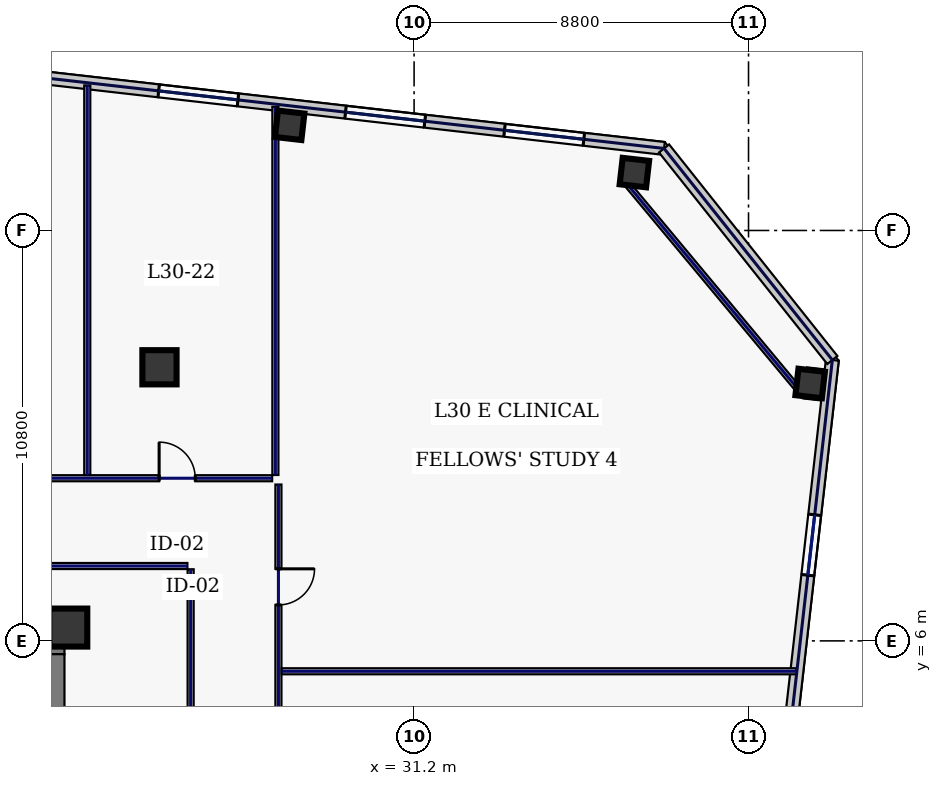
"""IFC4 building model, lengths in metres.
Left out: names, types, materials, properties, quantities, classifications, styles, units other than length and angle.
Written with IfcOpenShell. Run it as: python <this file> out.ifc"""

import sys

from ifc_helpers import new_model, si_unit, direction, frame, frame_2d, origin, origin_2d, place, context, subcontext, project, spatial, rectangle, hollow_rectangle, extrude, element, fill, save


model = new_model("IFC4")
c1 = context("Model", 3, precision=1e-05, world=origin(), true_north=direction((0.0, 1.0)))
c2 = subcontext(c1, "Body", "Model", "MODEL_VIEW")
j1 = project(units=[si_unit("LENGTHUNIT", "METRE"), si_unit("PLANEANGLEUNIT", "RADIAN")], contexts=[c1])
p1 = place(None, origin())
s1 = spatial("IfcSite", under=j1, at=p1, CompositionType="ELEMENT")
p2 = place(p1, origin())
s2 = spatial("IfcBuilding", under=s1, at=p2, CompositionType="ELEMENT")
p3 = place(p2, frame((0.0, 0.0, 133.4)))
s3 = spatial("IfcBuildingStorey", under=s2, at=p3, CompositionType="ELEMENT", Elevation=133.4)
p4 = place(p3, frame((10.45, 6.0, 0.0), z_axis=(0.0, 0.0, 1.0), x_axis=(1.0, 0.0, 0.0)))
e1 = element("IfcWall", 1, at=p4, inside=s3, PredefinedType="SHEAR", context=c2, shape_type="SweptSolid", body=[
    extrude(rectangle(XDim=11.55, YDim=0.7, at=frame_2d((5.775, 0.0))), origin(), (0.0, 0.0, 1.0), 3.74),
])
p5 = place(p3, frame((21.6, -5.65, 0.0), z_axis=(0.0, 0.0, 1.0), x_axis=(0.0, 1.0, 0.0)))
e2 = element("IfcWall", 2, at=p5, inside=s3, PredefinedType="SHEAR", context=c2, shape_type="SweptSolid", body=[
    extrude(rectangle(XDim=11.3, YDim=0.8, at=frame_2d((5.65, 0.0))), origin(), (0.0, 0.0, 1.0), 3.74),
])
p6 = place(p3, frame((22.1, 6.35, 0.0), z_axis=(0.0, 0.0, 1.0), x_axis=(1.0, 0.0, 0.0)))
e3 = element("IfcColumn", 3, at=p6, inside=s3, PredefinedType="COLUMN", context=c2, shape_type="SweptSolid", body=[
    extrude(hollow_rectangle(XDim=1.0, YDim=1.0, WallThickness=0.045, at=origin_2d()), origin(), (0.0, 0.0, 1.0), 3.74),
])
p7 = place(p3, frame((24.5, 13.2, 0.0), z_axis=(0.0, 0.0, 1.0), x_axis=(1.0, 0.0, 0.0)))
e4 = element("IfcColumn", 4, at=p7, inside=s3, PredefinedType="COLUMN", context=c2, shape_type="SweptSolid", body=[
    extrude(hollow_rectangle(XDim=0.9, YDim=0.9, WallThickness=0.04, at=origin_2d()), origin(), (0.0, 0.0, 1.0), 3.74),
])
for number, where, z_axis, x_axis in (
    (5, (36.997, 18.323, 0.0), (0.0, 0.0, 1.0), (0.994, -0.113, 0.0)),
    (6, (27.926, 19.568, 0.0), (0.0, 0.0, 1.0), (0.994, -0.113, 0.0)),
    (7, (41.622, 12.774, 0.0), (0.0, 0.0, 1.0), (0.994, -0.113, 0.0)),
):
    element("IfcColumn", number, at=place(p3, frame(where, z_axis=z_axis, x_axis=x_axis)), inside=s3, PredefinedType="COLUMN", context=c2, shape_type="SweptSolid", body=[
        extrude(hollow_rectangle(XDim=0.7, YDim=0.7, WallThickness=0.032, at=origin_2d()), origin(), (0.0, 0.0, 1.0), 3.74),
    ])
p8 = place(p3, frame((37.777, 18.958, 0.0), z_axis=(0.0, 0.0, 1.0), x_axis=(-0.993571362037, 0.113207546299, 0.0)))
e8 = element("IfcWall", 8, at=p8, inside=s3, PredefinedType="STANDARD", context=c2, shape_type="SweptSolid", body=[
    extrude(rectangle(XDim=21.223, YDim=0.34, at=frame_2d((10.611, 0.0))), origin(), (0.0, 0.0, 1.0), 3.74),
])
p9 = place(p8, frame((16.756, 0.0, 0.67)))
e9 = element("IfcOpeningElement", 9, at=p9, cuts=e8, PredefinedType="OPENING", context=c2, shape_type="SweptSolid", body=[
    extrude(rectangle(XDim=0.85, YDim=1.85, at=frame_2d((0.425, 0.925))), frame((0.0, 0.18, 0.0), z_axis=(0.0, -1.0, 0.0), x_axis=(1.0, 0.0, 0.0)), (0.0, 0.0, 1.0), 0.36),
])
p10 = place(p8, frame((11.285, 0.0, 0.67)))
e10 = element("IfcOpeningElement", 10, at=p10, cuts=e8, PredefinedType="OPENING", context=c2, shape_type="SweptSolid", body=[
    extrude(rectangle(XDim=2.1, YDim=2.2, at=frame_2d((1.05, 1.1))), frame((0.0, 0.18, 0.0), z_axis=(0.0, -1.0, 0.0), x_axis=(1.0, 0.0, 0.0)), (0.0, 0.0, 1.0), 0.36),
])
p11 = place(p8, frame((6.336, 0.0, 0.67)))
e11 = element("IfcOpeningElement", 11, at=p11, cuts=e8, PredefinedType="OPENING", context=c2, shape_type="SweptSolid", body=[
    extrude(rectangle(XDim=2.1, YDim=2.2, at=frame_2d((1.05, 1.1))), frame((0.0, 0.18, 0.0), z_axis=(0.0, -1.0, 0.0), x_axis=(1.0, 0.0, 0.0)), (0.0, 0.0, 1.0), 0.36),
])
p12 = place(p8, frame((2.125, 0.0, 0.67)))
e12 = element("IfcOpeningElement", 12, at=p12, cuts=e8, PredefinedType="OPENING", context=c2, shape_type="SweptSolid", body=[
    extrude(rectangle(XDim=2.1, YDim=2.2, at=frame_2d((1.05, 1.1))), frame((0.0, 0.18, 0.0), z_axis=(0.0, -1.0, 0.0), x_axis=(1.0, 0.0, 0.0)), (0.0, 0.0, 1.0), 0.36),
])
p13 = place(p3, frame((37.768, -25.556, 0.0), z_axis=(0.0, 0.0, 1.0), x_axis=(0.113201605824, 0.993572038877, 0.0)))
e13 = element("IfcWall", 13, at=p13, inside=s3, PredefinedType="STANDARD", context=c2, shape_type="SweptSolid", body=[
    extrude(rectangle(XDim=39.2, YDim=0.34, at=frame_2d((19.6, 0.0))), origin(), (0.0, 0.0, 1.0), 3.74),
])
p14 = place(p13, frame((4.1, 0.0, 0.58)))
e14 = element("IfcOpeningElement", 14, at=p14, cuts=e13, PredefinedType="OPENING", context=c2, shape_type="SweptSolid", body=[
    extrude(rectangle(XDim=1.6, YDim=2.3, at=frame_2d((0.8, 1.15))), frame((0.0, 0.18, 0.0), z_axis=(0.0, -1.0, 0.0), x_axis=(1.0, 0.0, 0.0)), (0.0, 0.0, 1.0), 0.36),
])
p15 = place(p13, frame((13.9, 0.0, 0.58)))
e15 = element("IfcOpeningElement", 15, at=p15, cuts=e13, PredefinedType="OPENING", context=c2, shape_type="SweptSolid", body=[
    extrude(rectangle(XDim=1.6, YDim=2.3, at=frame_2d((0.8, 1.15))), frame((0.0, 0.18, 0.0), z_axis=(0.0, -1.0, 0.0), x_axis=(1.0, 0.0, 0.0)), (0.0, 0.0, 1.0), 0.36),
])
p16 = place(p13, frame((23.35, 0.0, 0.75)))
e16 = element("IfcOpeningElement", 16, at=p16, cuts=e13, PredefinedType="OPENING", context=c2, shape_type="SweptSolid", body=[
    extrude(rectangle(XDim=0.85, YDim=1.85, at=frame_2d((0.425, 0.925))), frame((0.0, 0.18, 0.0), z_axis=(0.0, -1.0, 0.0), x_axis=(1.0, 0.0, 0.0)), (0.0, 0.0, 1.0), 0.36),
])
p17 = place(p13, frame((33.5, 0.0, 0.58)))
e17 = element("IfcOpeningElement", 17, at=p17, cuts=e13, PredefinedType="OPENING", context=c2, shape_type="SweptSolid", body=[
    extrude(rectangle(XDim=1.6, YDim=2.3, at=frame_2d((0.8, 1.15))), frame((0.0, 0.18, 0.0), z_axis=(0.0, -1.0, 0.0), x_axis=(1.0, 0.0, 0.0)), (0.0, 0.0, 1.0), 0.36),
])
p18 = place(p3, frame((42.206, 13.392, 0.0), z_axis=(0.0, 0.0, 1.0), x_axis=(-0.622524521309, 0.782600294128, 0.0)))
e18 = element("IfcWall", 18, at=p18, inside=s3, PredefinedType="STANDARD", context=c2, shape_type="SweptSolid", body=[
    extrude(rectangle(XDim=7.113, YDim=0.34, at=frame_2d((3.557, 0.0))), origin(), (0.0, 0.0, 1.0), 3.74),
])
p19 = place(p3, frame((41.361, 12.556, 0.0), z_axis=(0.0, 0.0, 1.0), x_axis=(-0.640217638562, 0.768193579298, 0.0)))
e19 = element("IfcWall", 19, at=p19, inside=s3, PredefinedType="PARTITIONING", context=c2, shape_type="SweptSolid", body=[
    extrude(rectangle(XDim=7.224, YDim=0.16, at=frame_2d((3.612, 0.0))), origin(), (0.0, 0.0, 1.0), 3.74),
])
p20 = place(p3, frame((-27.465, 10.28, 0.0), z_axis=(0.0, 0.0, 1.0), x_axis=(1.0, 0.0, 0.0)))
e20 = element("IfcWall", 20, at=p20, inside=s3, PredefinedType="PARTITIONING", context=c2, shape_type="SweptSolid", body=[
    extrude(rectangle(XDim=54.93, YDim=0.16, at=frame_2d((27.465, 0.0))), origin(), (0.0, 0.0, 1.0), 3.74),
])
p21 = place(p20, frame((1.869, 0.0, 0.0)))
e21 = element("IfcOpeningElement", 21, at=p21, cuts=e20, PredefinedType="OPENING", context=c2, shape_type="SweptSolid", body=[
    extrude(rectangle(XDim=1.3, YDim=2.2, at=frame_2d((0.65, 1.1))), frame((0.0, 0.09, 0.0), z_axis=(0.0, -1.0, 0.0), x_axis=(1.0, 0.0, 0.0)), (0.0, 0.0, 1.0), 0.18),
])
p22 = place(p20, frame((7.1, 0.0, 0.0)))
e22 = element("IfcOpeningElement", 22, at=p22, cuts=e20, PredefinedType="OPENING", context=c2, shape_type="SweptSolid", body=[
    extrude(rectangle(XDim=0.95, YDim=2.2, at=frame_2d((0.475, 1.1))), frame((0.0, 0.09, 0.0), z_axis=(0.0, -1.0, 0.0), x_axis=(1.0, 0.0, 0.0)), (0.0, 0.0, 1.0), 0.18),
])
p23 = place(p20, frame((12.5, 0.0, 0.0)))
e23 = element("IfcOpeningElement", 23, at=p23, cuts=e20, PredefinedType="OPENING", context=c2, shape_type="SweptSolid", body=[
    extrude(rectangle(XDim=0.95, YDim=2.2, at=frame_2d((0.475, 1.1))), frame((0.0, 0.09, 0.0), z_axis=(0.0, -1.0, 0.0), x_axis=(1.0, 0.0, 0.0)), (0.0, 0.0, 1.0), 0.18),
])
p24 = place(p20, frame((18.325, 0.0, 0.0)))
e24 = element("IfcOpeningElement", 24, at=p24, cuts=e20, PredefinedType="OPENING", context=c2, shape_type="SweptSolid", body=[
    extrude(rectangle(XDim=0.95, YDim=2.2, at=frame_2d((0.475, 1.1))), frame((0.0, 0.09, 0.0), z_axis=(0.0, -1.0, 0.0), x_axis=(1.0, 0.0, 0.0)), (0.0, 0.0, 1.0), 0.18),
])
p25 = place(p20, frame((24.575, 0.0, 0.0)))
e25 = element("IfcOpeningElement", 25, at=p25, cuts=e20, PredefinedType="OPENING", context=c2, shape_type="SweptSolid", body=[
    extrude(rectangle(XDim=0.95, YDim=2.2, at=frame_2d((0.475, 1.1))), frame((0.0, 0.09, 0.0), z_axis=(0.0, -1.0, 0.0), x_axis=(1.0, 0.0, 0.0)), (0.0, 0.0, 1.0), 0.18),
])
p26 = place(p20, frame((30.69, 0.0, 0.0)))
e26 = element("IfcOpeningElement", 26, at=p26, cuts=e20, PredefinedType="OPENING", context=c2, shape_type="SweptSolid", body=[
    extrude(rectangle(XDim=1.3, YDim=2.2, at=frame_2d((0.65, 1.1))), frame((0.0, 0.09, 0.0), z_axis=(0.0, -1.0, 0.0), x_axis=(1.0, 0.0, 0.0)), (0.0, 0.0, 1.0), 0.18),
])
p27 = place(p20, frame((37.02, 0.0, 0.0)))
e27 = element("IfcOpeningElement", 27, at=p27, cuts=e20, PredefinedType="OPENING", context=c2, shape_type="SweptSolid", body=[
    extrude(rectangle(XDim=1.3, YDim=2.2, at=frame_2d((0.65, 1.1))), frame((0.0, 0.09, 0.0), z_axis=(0.0, -1.0, 0.0), x_axis=(1.0, 0.0, 0.0)), (0.0, 0.0, 1.0), 0.18),
])
p28 = place(p20, frame((44.73, 0.0, 0.0)))
e28 = element("IfcOpeningElement", 28, at=p28, cuts=e20, PredefinedType="OPENING", context=c2, shape_type="SweptSolid", body=[
    extrude(rectangle(XDim=1.3, YDim=2.2, at=frame_2d((0.65, 1.1))), frame((0.0, 0.09, 0.0), z_axis=(0.0, -1.0, 0.0), x_axis=(1.0, 0.0, 0.0)), (0.0, 0.0, 1.0), 0.18),
])
p29 = place(p20, frame((51.956, 0.0, 0.0)))
e29 = element("IfcOpeningElement", 29, at=p29, cuts=e20, PredefinedType="OPENING", context=c2, shape_type="SweptSolid", body=[
    extrude(rectangle(XDim=0.95, YDim=2.2, at=frame_2d((0.475, 1.1))), frame((0.0, 0.09, 0.0), z_axis=(0.0, -1.0, 0.0), x_axis=(1.0, 0.0, 0.0)), (0.0, 0.0, 1.0), 0.18),
])
p30 = place(p3, frame((27.63, 10.115, 0.0), z_axis=(0.0, 0.0, 1.0), x_axis=(0.0, -1.0, 0.0)))
e30 = element("IfcWall", 30, at=p30, inside=s3, PredefinedType="PARTITIONING", context=c2, shape_type="SweptSolid", body=[
    extrude(rectangle(XDim=20.13, YDim=0.16, at=frame_2d((10.065, 0.0))), origin(), (0.0, 0.0, 1.0), 3.74),
])
p31 = place(p30, frame((17.181, 0.0, 0.0)))
e31 = element("IfcOpeningElement", 31, at=p31, cuts=e30, PredefinedType="OPENING", context=c2, shape_type="SweptSolid", body=[
    extrude(rectangle(XDim=0.95, YDim=2.2, at=frame_2d((0.475, 1.1))), frame((0.0, 0.09, 0.0), z_axis=(0.0, -1.0, 0.0), x_axis=(1.0, 0.0, 0.0)), (0.0, 0.0, 1.0), 0.18),
])
p32 = place(p30, frame((12.325, 0.0, 0.0)))
e32 = element("IfcOpeningElement", 32, at=p32, cuts=e30, PredefinedType="OPENING", context=c2, shape_type="SweptSolid", body=[
    extrude(rectangle(XDim=0.95, YDim=2.2, at=frame_2d((0.475, 1.1))), frame((0.0, 0.09, 0.0), z_axis=(0.0, -1.0, 0.0), x_axis=(1.0, 0.0, 0.0)), (0.0, 0.0, 1.0), 0.18),
])
p33 = place(p30, frame((7.125, 0.0, 0.0)))
e33 = element("IfcOpeningElement", 33, at=p33, cuts=e30, PredefinedType="OPENING", context=c2, shape_type="SweptSolid", body=[
    extrude(rectangle(XDim=0.95, YDim=2.2, at=frame_2d((0.475, 1.1))), frame((0.0, 0.09, 0.0), z_axis=(0.0, -1.0, 0.0), x_axis=(1.0, 0.0, 0.0)), (0.0, 0.0, 1.0), 0.18),
])
p34 = place(p30, frame((2.219, 0.0, 0.0)))
e34 = element("IfcOpeningElement", 34, at=p34, cuts=e30, PredefinedType="OPENING", context=c2, shape_type="SweptSolid", body=[
    extrude(rectangle(XDim=0.95, YDim=2.2, at=frame_2d((0.475, 1.1))), frame((0.0, 0.09, 0.0), z_axis=(0.0, -1.0, 0.0), x_axis=(1.0, 0.0, 0.0)), (0.0, 0.0, 1.0), 0.18),
])
p35 = place(p3, frame((25.235, 7.97, 0.0), z_axis=(0.0, 0.0, 1.0), x_axis=(-1.0, 0.0, 0.0)))
e35 = element("IfcWall", 35, at=p35, inside=s3, PredefinedType="PARTITIONING", context=c2, shape_type="SweptSolid", body=[
    extrude(rectangle(XDim=14.57, YDim=0.16, at=frame_2d((7.285, 0.0))), origin(), (0.0, 0.0, 1.0), 3.74),
])
p36 = place(p3, frame((25.32, -7.785, 0.0), z_axis=(0.0, 0.0, 1.0), x_axis=(0.0, 1.0, 0.0)))
e36 = element("IfcWall", 36, at=p36, inside=s3, PredefinedType="PARTITIONING", context=c2, shape_type="SweptSolid", body=[
    extrude(rectangle(XDim=15.67, YDim=0.16, at=frame_2d((7.835, 0.0))), origin(), (0.0, 0.0, 1.0), 3.74),
])
p37 = place(p3, frame((27.55, 10.365, 0.0), z_axis=(0.0, 0.0, 1.0), x_axis=(0.0, 1.0, 0.0)))
e37 = element("IfcWall", 37, at=p37, inside=s3, PredefinedType="PARTITIONING", context=c2, shape_type="SweptSolid", body=[
    extrude(rectangle(XDim=9.688, YDim=0.16, at=frame_2d((4.844, 0.0))), origin(), (0.0, 0.0, 1.0), 3.74),
])
p38 = place(p3, frame((22.6, 10.365, 0.0), z_axis=(0.0, 0.0, 1.0), x_axis=(0.0, 1.0, 0.0)))
e38 = element("IfcWall", 38, at=p38, inside=s3, PredefinedType="PARTITIONING", context=c2, shape_type="SweptSolid", body=[
    extrude(rectangle(XDim=10.252, YDim=0.16, at=frame_2d((5.126, 0.0))), origin(), (0.0, 0.0, 1.0), 3.74),
])
p39 = place(p3, frame((27.715, 5.2, 0.0), z_axis=(0.0, 0.0, 1.0), x_axis=(1.0, 0.0, 0.0)))
e39 = element("IfcWall", 39, at=p39, inside=s3, PredefinedType="PARTITIONING", context=c2, shape_type="SweptSolid", body=[
    extrude(rectangle(XDim=13.537, YDim=0.16, at=frame_2d((6.769, 0.0))), origin(), (0.0, 0.0, 1.0), 3.74),
])
p40 = place(p10, origin())
e40 = element("IfcWindow", 40, at=p40, inside=s3, PartitioningType="SINGLE_PANEL", PredefinedType="WINDOW", context=c2, shape_type="SweptSolid", body=[
    extrude(rectangle(XDim=2.1, YDim=2.2, at=frame_2d((1.05, 1.1))), frame((0.0, 0.03, 0.0), z_axis=(0.0, -1.0, 0.0), x_axis=(1.0, 0.0, 0.0)), (0.0, 0.0, 1.0), 0.06),
])
fill(e10, e40)
p41 = place(p11, origin())
e41 = element("IfcWindow", 41, at=p41, inside=s3, PartitioningType="SINGLE_PANEL", PredefinedType="WINDOW", context=c2, shape_type="SweptSolid", body=[
    extrude(rectangle(XDim=2.1, YDim=2.2, at=frame_2d((1.05, 1.1))), frame((0.0, 0.03, 0.0), z_axis=(0.0, -1.0, 0.0), x_axis=(1.0, 0.0, 0.0)), (0.0, 0.0, 1.0), 0.06),
])
fill(e11, e41)
p42 = place(p12, origin())
e42 = element("IfcWindow", 42, at=p42, inside=s3, PartitioningType="SINGLE_PANEL", PredefinedType="WINDOW", context=c2, shape_type="SweptSolid", body=[
    extrude(rectangle(XDim=2.1, YDim=2.2, at=frame_2d((1.05, 1.1))), frame((0.0, 0.03, 0.0), z_axis=(0.0, -1.0, 0.0), x_axis=(1.0, 0.0, 0.0)), (0.0, 0.0, 1.0), 0.06),
])
fill(e12, e42)
p43 = place(p17, origin())
e43 = element("IfcWindow", 43, at=p43, inside=s3, PartitioningType="SINGLE_PANEL", PredefinedType="WINDOW", context=c2, shape_type="SweptSolid", body=[
    extrude(rectangle(XDim=1.6, YDim=2.3, at=frame_2d((0.8, 1.15))), frame((0.0, 0.03, 0.0), z_axis=(0.0, -1.0, 0.0), x_axis=(1.0, 0.0, 0.0)), (0.0, 0.0, 1.0), 0.06),
])
fill(e17, e43)
p44 = place(p29, origin())
e44 = element("IfcDoor", 44, at=p44, inside=s3, OperationType="SINGLE_SWING_LEFT", PredefinedType="DOOR", context=c2, shape_type="SweptSolid", body=[
    extrude(rectangle(XDim=0.95, YDim=2.2, at=frame_2d((0.475, 1.1))), frame((0.0, 0.025, 0.0), z_axis=(0.0, -1.0, 0.0), x_axis=(1.0, 0.0, 0.0)), (0.0, 0.0, 1.0), 0.05),
])
fill(e29, e44)
p45 = place(p34, origin())
e45 = element("IfcDoor", 45, at=p45, inside=s3, OperationType="SINGLE_SWING_LEFT", PredefinedType="DOOR", context=c2, shape_type="SweptSolid", body=[
    extrude(rectangle(XDim=0.95, YDim=2.2, at=frame_2d((0.475, 1.1))), frame((0.0, 0.025, 0.0), z_axis=(0.0, -1.0, 0.0), x_axis=(1.0, 0.0, 0.0)), (0.0, 0.0, 1.0), 0.05),
])
fill(e34, e45)
save(model, sys.argv[1])
